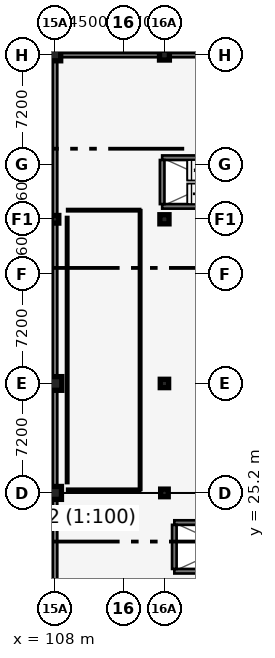
"""IFC4 building model, lengths in metres.
Left out: names, types, materials, properties, quantities, classifications, styles, units other than length and angle.
Written with IfcOpenShell. Run it as: python <this file> out.ifc"""

import sys

from ifc_helpers import new_model, si_unit, direction, frame, frame_2d, origin, origin_2d, place, context, subcontext, project, spatial, rectangle, circle, extrude, element, fill, save


model = new_model("IFC4")
c1 = context("Model", 3, precision=1e-05, world=origin(), true_north=direction((0.0, 1.0)))
c2 = subcontext(c1, "Body", "Model", "MODEL_VIEW")
j1 = project(units=[si_unit("LENGTHUNIT", "METRE"), si_unit("PLANEANGLEUNIT", "RADIAN")], contexts=[c1])
p1 = place(None, origin())
s1 = spatial("IfcSite", under=j1, at=p1, CompositionType="ELEMENT")
p2 = place(p1, origin())
s2 = spatial("IfcBuilding", under=s1, at=p2, CompositionType="ELEMENT")
p3 = place(p2, frame((0.0, 0.0, 4.8)))
s3 = spatial("IfcBuildingStorey", under=s2, at=p3, CompositionType="ELEMENT", Elevation=4.8)
p4 = place(p3, frame((108.0, 25.2, 0.0), z_axis=(0.0, 0.0, 1.0), x_axis=(1.0, 0.0, 0.0)))
e1 = element("IfcColumn", 1, at=p4, inside=s3, PredefinedType="COLUMN", context=c2, shape_type="SweptSolid", body=[
    extrude(rectangle(XDim=0.85, YDim=0.85, at=origin_2d()), origin(), (0.0, 0.0, 1.0), 4.2),
])
p5 = place(p3, frame((108.0, 32.4, 0.0), z_axis=(0.0, 0.0, 1.0), x_axis=(1.0, 0.0, 0.0)))
e2 = element("IfcColumn", 2, at=p5, inside=s3, PredefinedType="COLUMN", context=c2, shape_type="SweptSolid", body=[
    extrude(rectangle(XDim=0.9, YDim=0.9, at=origin_2d()), origin(), (0.0, 0.0, 1.0), 4.2),
])
p6 = place(p3, frame((108.0, 43.2, 0.0), z_axis=(0.0, 0.0, 1.0), x_axis=(1.0, 0.0, 0.0)))
e3 = element("IfcColumn", 3, at=p6, inside=s3, PredefinedType="COLUMN", context=c2, shape_type="SweptSolid", body=[
    extrude(circle(Radius=0.25, at=origin_2d()), origin(), (0.0, 0.0, 1.0), 4.2),
])
p7 = place(p3, frame((108.0, 54.0, 0.0), z_axis=(0.0, 0.0, 1.0), x_axis=(1.0, 0.0, 0.0)))
e4 = element("IfcColumn", 4, at=p7, inside=s3, PredefinedType="COLUMN", context=c2, shape_type="SweptSolid", body=[
    extrude(circle(Radius=0.375, at=origin_2d()), origin(), (0.0, 0.0, 1.0), 4.2),
])
p8 = place(p3, frame((115.2, 25.2, 0.0), z_axis=(0.0, 0.0, 1.0), x_axis=(1.0, 0.0, 0.0)))
e5 = element("IfcColumn", 5, at=p8, inside=s3, PredefinedType="COLUMN", context=c2, shape_type="SweptSolid", body=[
    extrude(rectangle(XDim=0.5, YDim=0.5, at=origin_2d()), origin(), (0.0, 0.0, 1.0), 4.2),
])
p9 = place(p3, frame((115.2, 32.4, 0.0), z_axis=(0.0, 0.0, 1.0), x_axis=(1.0, 0.0, 0.0)))
e6 = element("IfcColumn", 6, at=p9, inside=s3, PredefinedType="COLUMN", context=c2, shape_type="SweptSolid", body=[
    extrude(rectangle(XDim=0.55, YDim=0.55, at=origin_2d()), origin(), (0.0, 0.0, 1.0), 4.2),
])
p10 = place(p3, frame((115.2, 43.2, 0.0), z_axis=(0.0, 0.0, 1.0), x_axis=(1.0, 0.0, 0.0)))
e7 = element("IfcColumn", 7, at=p10, inside=s3, PredefinedType="COLUMN", context=c2, shape_type="SweptSolid", body=[
    extrude(rectangle(XDim=0.6, YDim=0.6, at=origin_2d()), origin(), (0.0, 0.0, 1.0), 4.2),
])
p11 = place(p3, frame((115.2, 54.0, 0.0), z_axis=(0.0, 0.0, 1.0), x_axis=(1.0, 0.0, 0.0)))
e8 = element("IfcColumn", 8, at=p11, inside=s3, PredefinedType="COLUMN", context=c2, shape_type="SweptSolid", body=[
    extrude(rectangle(XDim=0.65, YDim=0.65, at=origin_2d()), origin(), (0.0, 0.0, 1.0), 4.2),
])
p12 = place(p3, frame((108.0, 54.0, 0.0), z_axis=(0.0, 0.0, 1.0), x_axis=(0.0, -1.0, 0.0)))
e9 = element("IfcWall", 9, at=p12, inside=s3, PredefinedType="SOLIDWALL", context=c2, shape_type="SweptSolid", body=[
    extrude(rectangle(XDim=43.2, YDim=0.3, at=frame_2d((21.6, 0.0))), origin(), (0.0, 0.0, 1.0), 3.5),
])
p13 = place(p12, frame((2.2, 0.0, 0.72)))
e10 = element("IfcOpeningElement", 10, at=p13, cuts=e9, PredefinedType="OPENING", context=c2, shape_type="SweptSolid", body=[
    extrude(rectangle(XDim=1.8, YDim=2.15, at=frame_2d((0.9, 1.075))), frame((0.0, 0.16, 0.0), z_axis=(0.0, -1.0, 0.0), x_axis=(1.0, 0.0, 0.0)), (0.0, 0.0, 1.0), 0.32),
])
p14 = place(p12, frame((16.6, 0.0, 0.72)))
e11 = element("IfcOpeningElement", 11, at=p14, cuts=e9, PredefinedType="OPENING", context=c2, shape_type="SweptSolid", body=[
    extrude(rectangle(XDim=1.35, YDim=2.05, at=frame_2d((0.675, 1.025))), frame((0.0, 0.16, 0.0), z_axis=(0.0, -1.0, 0.0), x_axis=(1.0, 0.0, 0.0)), (0.0, 0.0, 1.0), 0.32),
])
p15 = place(p12, frame((23.8, 0.0, 0.72)))
e12 = element("IfcOpeningElement", 12, at=p15, cuts=e9, PredefinedType="OPENING", context=c2, shape_type="SweptSolid", body=[
    extrude(rectangle(XDim=1.5, YDim=2.1, at=frame_2d((0.75, 1.05))), frame((0.0, 0.16, 0.0), z_axis=(0.0, -1.0, 0.0), x_axis=(1.0, 0.0, 0.0)), (0.0, 0.0, 1.0), 0.32),
])
p16 = place(p12, frame((31.0, 0.0, 0.72)))
e13 = element("IfcOpeningElement", 13, at=p16, cuts=e9, PredefinedType="OPENING", context=c2, shape_type="SweptSolid", body=[
    extrude(rectangle(XDim=1.65, YDim=2.1, at=frame_2d((0.825, 1.05))), frame((0.0, 0.16, 0.0), z_axis=(0.0, -1.0, 0.0), x_axis=(1.0, 0.0, 0.0)), (0.0, 0.0, 1.0), 0.32),
])
p17 = place(p3, frame((165.6, 54.0, 0.0), z_axis=(0.0, 0.0, 1.0), x_axis=(-1.0, 0.0, 0.0)))
e14 = element("IfcWall", 14, at=p17, inside=s3, PredefinedType="SOLIDWALL", context=c2, shape_type="SweptSolid", body=[
    extrude(rectangle(XDim=57.6, YDim=0.28, at=frame_2d((28.8, 0.0))), origin(), (0.0, 0.0, 1.0), 3.5),
])
p18 = place(p17, frame((2.2, 0.0, 0.78)))
e15 = element("IfcOpeningElement", 15, at=p18, cuts=e14, PredefinedType="OPENING", context=c2, shape_type="SweptSolid", body=[
    extrude(rectangle(XDim=1.65, YDim=1.8, at=frame_2d((0.825, 0.9))), frame((0.0, 0.15, 0.0), z_axis=(0.0, -1.0, 0.0), x_axis=(1.0, 0.0, 0.0)), (0.0, 0.0, 1.0), 0.3),
])
p19 = place(p17, frame((9.4, 0.0, 0.78)))
e16 = element("IfcOpeningElement", 16, at=p19, cuts=e14, PredefinedType="OPENING", context=c2, shape_type="SweptSolid", body=[
    extrude(rectangle(XDim=1.95, YDim=1.8, at=frame_2d((0.975, 0.9))), frame((0.0, 0.15, 0.0), z_axis=(0.0, -1.0, 0.0), x_axis=(1.0, 0.0, 0.0)), (0.0, 0.0, 1.0), 0.3),
])
p20 = place(p17, frame((16.6, 0.0, 0.78)))
e17 = element("IfcOpeningElement", 17, at=p20, cuts=e14, PredefinedType="OPENING", context=c2, shape_type="SweptSolid", body=[
    extrude(rectangle(XDim=2.1, YDim=1.8, at=frame_2d((1.05, 0.9))), frame((0.0, 0.15, 0.0), z_axis=(0.0, -1.0, 0.0), x_axis=(1.0, 0.0, 0.0)), (0.0, 0.0, 1.0), 0.3),
])
p21 = place(p17, frame((23.8, 0.0, 0.78)))
e18 = element("IfcOpeningElement", 18, at=p21, cuts=e14, PredefinedType="OPENING", context=c2, shape_type="SweptSolid", body=[
    extrude(rectangle(XDim=1.1, YDim=1.65, at=frame_2d((0.55, 0.825))), frame((0.0, 0.15, 0.0), z_axis=(0.0, -1.0, 0.0), x_axis=(1.0, 0.0, 0.0)), (0.0, 0.0, 1.0), 0.3),
])
p22 = place(p17, frame((31.0, 0.0, 0.78)))
e19 = element("IfcOpeningElement", 19, at=p22, cuts=e14, PredefinedType="OPENING", context=c2, shape_type="SweptSolid", body=[
    extrude(rectangle(XDim=1.25, YDim=1.7, at=frame_2d((0.625, 0.85))), frame((0.0, 0.15, 0.0), z_axis=(0.0, -1.0, 0.0), x_axis=(1.0, 0.0, 0.0)), (0.0, 0.0, 1.0), 0.3),
])
p23 = place(p17, frame((38.2, 0.0, 0.78)))
e20 = element("IfcOpeningElement", 20, at=p23, cuts=e14, PredefinedType="OPENING", context=c2, shape_type="SweptSolid", body=[
    extrude(rectangle(XDim=1.35, YDim=1.75, at=frame_2d((0.675, 0.875))), frame((0.0, 0.15, 0.0), z_axis=(0.0, -1.0, 0.0), x_axis=(1.0, 0.0, 0.0)), (0.0, 0.0, 1.0), 0.3),
])
p24 = place(p17, frame((45.4, 0.0, 0.78)))
e21 = element("IfcOpeningElement", 21, at=p24, cuts=e14, PredefinedType="OPENING", context=c2, shape_type="SweptSolid", body=[
    extrude(rectangle(XDim=1.5, YDim=1.75, at=frame_2d((0.75, 0.875))), frame((0.0, 0.15, 0.0), z_axis=(0.0, -1.0, 0.0), x_axis=(1.0, 0.0, 0.0)), (0.0, 0.0, 1.0), 0.3),
])
p25 = place(p3, frame((115.85, 20.05, 0.0), z_axis=(0.0, 0.0, 1.0), x_axis=(1.0, 0.0, 0.0)))
e22 = element("IfcWall", 22, at=p25, inside=s3, PredefinedType="SHEAR", context=c2, shape_type="SweptSolid", body=[
    extrude(rectangle(XDim=7.1, YDim=0.3, at=frame_2d((3.55, 0.0))), origin(), (0.0, 0.0, 1.0), 3.84),
])
p26 = place(p25, frame((0.35, 0.0, 0.0)))
e23 = element("IfcOpeningElement", 23, at=p26, cuts=e22, PredefinedType="OPENING", context=c2, shape_type="SweptSolid", body=[
    extrude(rectangle(XDim=1.07, YDim=2.15, at=frame_2d((0.535, 1.075))), frame((0.0, 0.16, 0.0), z_axis=(0.0, -1.0, 0.0), x_axis=(1.0, 0.0, 0.0)), (0.0, 0.0, 1.0), 0.32),
])
p27 = place(p3, frame((122.95, 23.25, 0.0), z_axis=(0.0, 0.0, 1.0), x_axis=(-1.0, 0.0, 0.0)))
e24 = element("IfcWall", 24, at=p27, inside=s3, PredefinedType="SHEAR", context=c2, shape_type="SweptSolid", body=[
    extrude(rectangle(XDim=7.1, YDim=0.3, at=frame_2d((3.55, 0.0))), origin(), (0.0, 0.0, 1.0), 3.84),
])
p28 = place(p3, frame((115.85, 23.1, 0.0), z_axis=(0.0, 0.0, 1.0), x_axis=(0.0, -1.0, 0.0)))
e25 = element("IfcWall", 25, at=p28, inside=s3, PredefinedType="SHEAR", context=c2, shape_type="SweptSolid", body=[
    extrude(rectangle(XDim=2.9, YDim=0.3, at=frame_2d((1.45, 0.0))), origin(), (0.0, 0.0, 1.0), 3.84),
])
for number, where, z_axis, x_axis in (
    (26, (115.05, 44.05, 0.0), (0.0, 0.0, 1.0), (1.0, 0.0, 0.0)),
    (27, (122.15, 47.25, 0.0), (0.0, 0.0, 1.0), (-1.0, 0.0, 0.0)),
):
    element("IfcWall", number, at=place(p3, frame(where, z_axis=z_axis, x_axis=x_axis)), inside=s3, PredefinedType="SHEAR", context=c2, shape_type="SweptSolid", body=[
        extrude(rectangle(XDim=7.1, YDim=0.3, at=frame_2d((3.55, 0.0))), origin(), (0.0, 0.0, 1.0), 3.925),
    ])
p29 = place(p3, frame((115.05, 47.1, 0.0), z_axis=(0.0, 0.0, 1.0), x_axis=(0.0, -1.0, 0.0)))
e28 = element("IfcWall", 28, at=p29, inside=s3, PredefinedType="SHEAR", context=c2, shape_type="SweptSolid", body=[
    extrude(rectangle(XDim=2.9, YDim=0.3, at=frame_2d((1.45, 0.0))), origin(), (0.0, 0.0, 1.0), 3.925),
])
p30 = place(p29, frame((0.75, 0.0, 0.0)))
e29 = element("IfcOpeningElement", 29, at=p30, cuts=e28, PredefinedType="OPENING", context=c2, shape_type="SweptSolid", body=[
    extrude(rectangle(XDim=1.07, YDim=2.15, at=frame_2d((0.535, 1.075))), frame((0.0, 0.16, 0.0), z_axis=(0.0, -1.0, 0.0), x_axis=(1.0, 0.0, 0.0)), (0.0, 0.0, 1.0), 0.32),
])
p31 = place(p3, frame((108.8, 43.8, 0.0), z_axis=(0.0, 0.0, 1.0), x_axis=(1.0, 0.0, 0.0)))
e30 = element("IfcWall", 30, at=p31, inside=s3, PredefinedType="PARTITIONING", context=c2, shape_type="SweptSolid", body=[
    extrude(rectangle(XDim=4.8, YDim=0.15, at=frame_2d((2.4, 0.0))), origin(), (0.0, 0.0, 1.0), 3.6),
])
p32 = place(p3, frame((113.6, 25.4, 0.0), z_axis=(0.0, 0.0, 1.0), x_axis=(-1.0, 0.0, 0.0)))
e31 = element("IfcWall", 31, at=p32, inside=s3, PredefinedType="PARTITIONING", context=c2, shape_type="SweptSolid", body=[
    extrude(rectangle(XDim=4.8, YDim=0.15, at=frame_2d((2.4, 0.0))), origin(), (0.0, 0.0, 1.0), 3.122),
])
p33 = place(p3, frame((108.8, 43.35, 0.0), z_axis=(0.0, 0.0, 1.0), x_axis=(0.0, -1.0, 0.0)))
e32 = element("IfcWall", 32, at=p33, inside=s3, PredefinedType="PARTITIONING", context=c2, shape_type="SweptSolid", body=[
    extrude(rectangle(XDim=17.5, YDim=0.15, at=frame_2d((8.75, 0.0))), origin(), (0.0, 0.0, 1.0), 3.157),
])
p34 = place(p3, frame((113.6, 25.4, 0.0), z_axis=(0.0, 0.0, 1.0), x_axis=(0.0, 1.0, 0.0)))
e33 = element("IfcWall", 33, at=p34, inside=s3, PredefinedType="PARTITIONING", context=c2, shape_type="SweptSolid", body=[
    extrude(rectangle(XDim=18.4, YDim=0.15, at=frame_2d((9.2, 0.0))), origin(), (0.0, 0.0, 1.0), 3.122),
])
p35 = place(p34, frame((8.72, 0.0, 0.0)))
e34 = element("IfcOpeningElement", 34, at=p35, cuts=e33, PredefinedType="OPENING", context=c2, shape_type="SweptSolid", body=[
    extrude(rectangle(XDim=0.96, YDim=2.15, at=frame_2d((0.48, 1.075))), frame((0.0, 0.085, 0.0), z_axis=(0.0, -1.0, 0.0), x_axis=(1.0, 0.0, 0.0)), (0.0, 0.0, 1.0), 0.17),
])
p36 = place(p13, origin())
e35 = element("IfcWindow", 35, at=p36, inside=s3, PartitioningType="SINGLE_PANEL", PredefinedType="WINDOW", context=c2, shape_type="SweptSolid", body=[
    extrude(rectangle(XDim=1.8, YDim=2.15, at=frame_2d((0.9, 1.075))), frame((0.0, 0.03, 0.0), z_axis=(0.0, -1.0, 0.0), x_axis=(1.0, 0.0, 0.0)), (0.0, 0.0, 1.0), 0.06),
])
fill(e10, e35)
p37 = place(p14, origin())
e36 = element("IfcWindow", 36, at=p37, inside=s3, PartitioningType="SINGLE_PANEL", PredefinedType="WINDOW", context=c2, shape_type="SweptSolid", body=[
    extrude(rectangle(XDim=1.35, YDim=2.05, at=frame_2d((0.675, 1.025))), frame((0.0, 0.03, 0.0), z_axis=(0.0, -1.0, 0.0), x_axis=(1.0, 0.0, 0.0)), (0.0, 0.0, 1.0), 0.06),
])
fill(e11, e36)
p38 = place(p15, origin())
e37 = element("IfcWindow", 37, at=p38, inside=s3, PartitioningType="SINGLE_PANEL", PredefinedType="WINDOW", context=c2, shape_type="SweptSolid", body=[
    extrude(rectangle(XDim=1.5, YDim=2.1, at=frame_2d((0.75, 1.05))), frame((0.0, 0.03, 0.0), z_axis=(0.0, -1.0, 0.0), x_axis=(1.0, 0.0, 0.0)), (0.0, 0.0, 1.0), 0.06),
])
fill(e12, e37)
p39 = place(p16, origin())
e38 = element("IfcWindow", 38, at=p39, inside=s3, PartitioningType="SINGLE_PANEL", PredefinedType="WINDOW", context=c2, shape_type="SweptSolid", body=[
    extrude(rectangle(XDim=1.65, YDim=2.1, at=frame_2d((0.825, 1.05))), frame((0.0, 0.03, 0.0), z_axis=(0.0, -1.0, 0.0), x_axis=(1.0, 0.0, 0.0)), (0.0, 0.0, 1.0), 0.06),
])
fill(e13, e38)
p40 = place(p26, origin())
e39 = element("IfcDoor", 39, at=p40, inside=s3, OperationType="SINGLE_SWING_RIGHT", PredefinedType="DOOR", context=c2, shape_type="SweptSolid", body=[
    extrude(rectangle(XDim=1.07, YDim=2.15, at=frame_2d((0.535, 1.075))), frame((0.0, 0.025, 0.0), z_axis=(0.0, -1.0, 0.0), x_axis=(1.0, 0.0, 0.0)), (0.0, 0.0, 1.0), 0.05),
])
fill(e23, e39)
p41 = place(p30, origin())
e40 = element("IfcDoor", 40, at=p41, inside=s3, OperationType="SINGLE_SWING_RIGHT", PredefinedType="DOOR", context=c2, shape_type="SweptSolid", body=[
    extrude(rectangle(XDim=1.07, YDim=2.15, at=frame_2d((0.535, 1.075))), frame((0.0, 0.025, 0.0), z_axis=(0.0, -1.0, 0.0), x_axis=(1.0, 0.0, 0.0)), (0.0, 0.0, 1.0), 0.05),
])
fill(e29, e40)
p42 = place(p35, origin())
e41 = element("IfcDoor", 41, at=p42, inside=s3, OperationType="SINGLE_SWING_LEFT", PredefinedType="DOOR", context=c2, shape_type="SweptSolid", body=[
    extrude(rectangle(XDim=0.96, YDim=2.15, at=frame_2d((0.48, 1.075))), frame((0.0, 0.025, 0.0), z_axis=(0.0, -1.0, 0.0), x_axis=(1.0, 0.0, 0.0)), (0.0, 0.0, 1.0), 0.05),
])
fill(e34, e41)
save(model, sys.argv[1])
